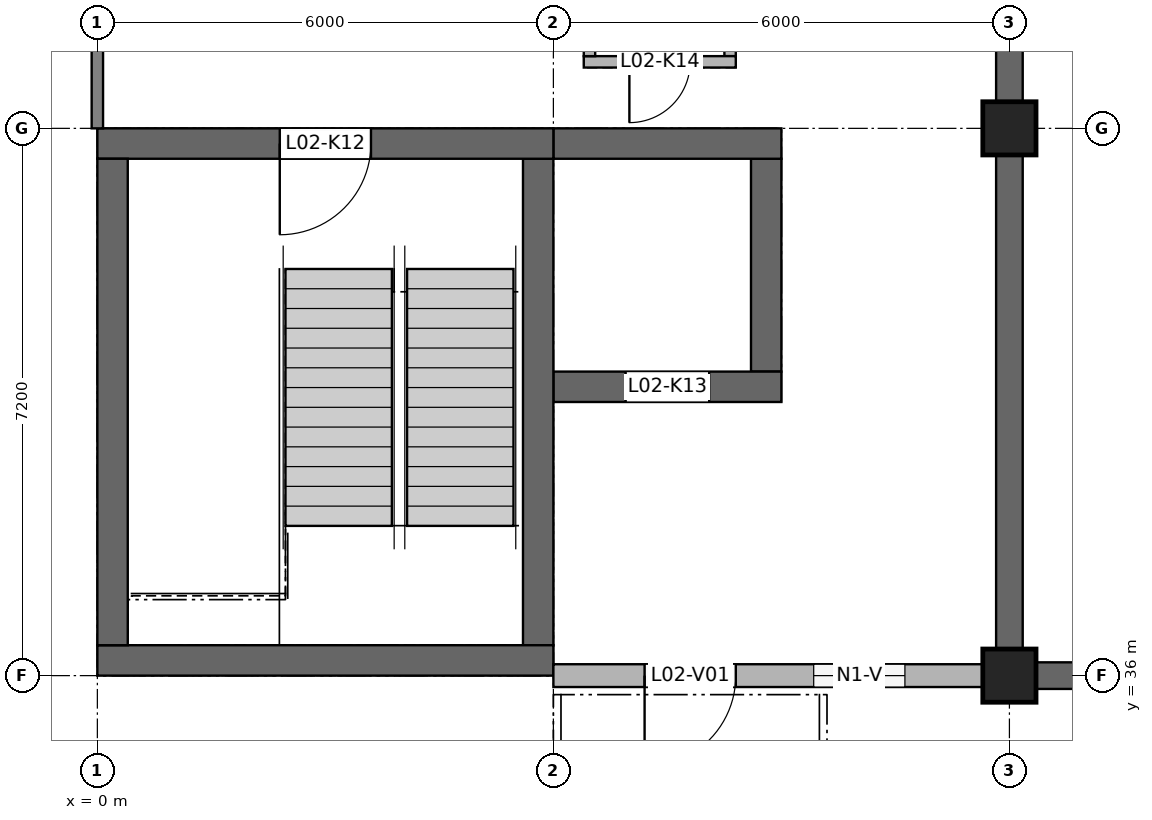
"""IFC4 building model, lengths in metres.
Left out: names, types, materials, properties, quantities, classifications, styles, units other than length and angle.
Written with IfcOpenShell. Run it as: python <this file> out.ifc"""

import sys

from ifc_helpers import new_model, si_unit, direction, frame, frame_2d, origin, origin_2d, place, context, subcontext, project, spatial, rectangle, extrude, element, fill, save


model = new_model("IFC4")
c1 = context("Model", 3, precision=1e-05, world=origin(), true_north=direction((0.0, 1.0)))
c2 = subcontext(c1, "Body", "Model", "MODEL_VIEW")
j1 = project(units=[si_unit("LENGTHUNIT", "METRE"), si_unit("PLANEANGLEUNIT", "RADIAN")], contexts=[c1])
p1 = place(None, origin())
s1 = spatial("IfcSite", under=j1, at=p1, CompositionType="ELEMENT")
p2 = place(p1, origin())
s2 = spatial("IfcBuilding", under=s1, at=p2, CompositionType="ELEMENT")
p3 = place(p2, frame((0.0, 0.0, 8.4)))
s3 = spatial("IfcBuildingStorey", under=s2, at=p3, CompositionType="ELEMENT", Elevation=8.4)
p4 = place(p3, frame((0.0, 36.2, 0.0), z_axis=(0.0, 0.0, 1.0), x_axis=(1.0, 0.0, 0.0)))
e1 = element("IfcWall", 1, at=p4, inside=s3, PredefinedType="SHEAR", context=c2, shape_type="SweptSolid", body=[
    extrude(rectangle(XDim=6.0, YDim=0.4, at=frame_2d((3.0, 0.0))), origin(), (0.0, 0.0, 1.0), 4.0),
])
p5 = place(p3, frame((0.0, 43.0, 0.0), z_axis=(0.0, 0.0, 1.0), x_axis=(1.0, 0.0, 0.0)))
e2 = element("IfcWall", 2, at=p5, inside=s3, PredefinedType="SHEAR", context=c2, shape_type="SweptSolid", body=[
    extrude(rectangle(XDim=6.0, YDim=0.4, at=frame_2d((3.0, 0.0))), origin(), (0.0, 0.0, 1.0), 4.0),
])
p6 = place(p5, frame((2.4, 0.0, 0.0)))
e3 = element("IfcOpeningElement", 3, at=p6, cuts=e2, PredefinedType="OPENING", context=c2, shape_type="SweptSolid", body=[
    extrude(rectangle(XDim=1.2, YDim=2.1, at=frame_2d((0.6, 1.05))), frame((0.0, 0.21, 0.0), z_axis=(0.0, -1.0, 0.0), x_axis=(1.0, 0.0, 0.0)), (0.0, 0.0, 1.0), 0.42),
])
for number, where, z_axis, x_axis in (
    (4, (0.2, 36.4, 0.0), (0.0, 0.0, 1.0), (0.0, 1.0, 0.0)),
    (5, (5.8, 36.4, 0.0), (0.0, 0.0, 1.0), (0.0, 1.0, 0.0)),
):
    element("IfcWall", number, at=place(p3, frame(where, z_axis=z_axis, x_axis=x_axis)), inside=s3, PredefinedType="SHEAR", context=c2, shape_type="SweptSolid", body=[
        extrude(rectangle(XDim=6.4, YDim=0.4, at=frame_2d((3.2, 0.0))), origin(), (0.0, 0.0, 1.0), 4.0),
    ])
p7 = place(p3, frame((6.0, 39.8, 0.0), z_axis=(0.0, 0.0, 1.0), x_axis=(1.0, 0.0, 0.0)))
e6 = element("IfcWall", 6, at=p7, inside=s3, PredefinedType="SHEAR", context=c2, shape_type="SweptSolid", body=[
    extrude(rectangle(XDim=3.0, YDim=0.4, at=frame_2d((1.5, 0.0))), origin(), (0.0, 0.0, 1.0), 4.2),
])
p8 = place(p7, frame((0.95, 0.0, 0.0)))
e7 = element("IfcOpeningElement", 7, at=p8, cuts=e6, PredefinedType="OPENING", context=c2, shape_type="SweptSolid", body=[
    extrude(rectangle(XDim=1.1, YDim=2.1, at=frame_2d((0.55, 1.05))), frame((0.0, 0.21, 0.0), z_axis=(0.0, -1.0, 0.0), x_axis=(1.0, 0.0, 0.0)), (0.0, 0.0, 1.0), 0.42),
])
p9 = place(p3, frame((6.0, 43.0, 0.0), z_axis=(0.0, 0.0, 1.0), x_axis=(1.0, 0.0, 0.0)))
e8 = element("IfcWall", 8, at=p9, inside=s3, PredefinedType="SHEAR", context=c2, shape_type="SweptSolid", body=[
    extrude(rectangle(XDim=3.0, YDim=0.4, at=frame_2d((1.5, 0.0))), origin(), (0.0, 0.0, 1.0), 4.2),
])
p10 = place(p3, frame((8.8, 40.0, 0.0), z_axis=(0.0, 0.0, 1.0), x_axis=(0.0, 1.0, 0.0)))
e9 = element("IfcWall", 9, at=p10, inside=s3, PredefinedType="SHEAR", context=c2, shape_type="SweptSolid", body=[
    extrude(rectangle(XDim=2.8, YDim=0.4, at=frame_2d((1.4, 0.0))), origin(), (0.0, 0.0, 1.0), 4.2),
])
p11 = place(p3, frame((6.4, 44.075, 0.0), z_axis=(0.0, 0.0, 1.0), x_axis=(1.0, 0.0, 0.0)))
e10 = element("IfcWall", 10, at=p11, inside=s3, PredefinedType="SOLIDWALL", context=c2, shape_type="SweptSolid", body=[
    extrude(rectangle(XDim=2.0, YDim=0.15, at=frame_2d((1.0, 0.0))), origin(), (0.0, 0.0, 1.0), 4.2),
])
p12 = place(p11, frame((0.6, 0.0, 0.0)))
e11 = element("IfcOpeningElement", 11, at=p12, cuts=e10, PredefinedType="OPENING", context=c2, shape_type="SweptSolid", body=[
    extrude(rectangle(XDim=0.8, YDim=2.1, at=frame_2d((0.4, 1.05))), frame((0.0, 0.085, 0.0), z_axis=(0.0, -1.0, 0.0), x_axis=(1.0, 0.0, 0.0)), (0.0, 0.0, 1.0), 0.17),
])
for number, where, z_axis, x_axis in (
    (12, (6.475, 44.15, 0.0), (0.0, 0.0, 1.0), (0.0, 1.0, 0.0)),
    (13, (8.325, 44.15, 0.0), (0.0, 0.0, 1.0), (0.0, 1.0, 0.0)),
):
    element("IfcWall", number, at=place(p3, frame(where, z_axis=z_axis, x_axis=x_axis)), inside=s3, PredefinedType="SOLIDWALL", context=c2, shape_type="SweptSolid", body=[
        extrude(rectangle(XDim=0.9, YDim=0.15, at=frame_2d((0.45, 0.0))), origin(), (0.0, 0.0, 1.0), 4.2),
    ])
for number, where, z_axis, x_axis in (
    (14, (12.0, 36.0, 0.0), (0.0, 0.0, 1.0), (1.0, 0.0, 0.0)),
    (15, (12.0, 43.2, 0.0), (0.0, 0.0, 1.0), (1.0, 0.0, 0.0)),
):
    element("IfcColumn", number, at=place(p3, frame(where, z_axis=z_axis, x_axis=x_axis)), inside=s3, PredefinedType="COLUMN", context=c2, shape_type="SweptSolid", body=[
        extrude(rectangle(XDim=0.7, YDim=0.7, at=origin_2d()), origin(), (0.0, 0.0, 1.0), 4.0),
    ])
for number, where, z_axis, x_axis in (
    (16, (12.0, 36.35, 0.0), (0.0, 0.0, 1.0), (0.0, 1.0, 0.0)),
    (17, (12.0, 43.55, 0.0), (0.0, 0.0, 1.0), (0.0, 1.0, 0.0)),
):
    element("IfcWall", number, at=place(p3, frame(where, z_axis=z_axis, x_axis=x_axis)), inside=s3, PredefinedType="SHEAR", context=c2, shape_type="SweptSolid", body=[
        extrude(rectangle(XDim=6.5, YDim=0.35, at=frame_2d((3.25, 0.0))), origin(), (0.0, 0.0, 1.0), 3.1),
    ])
p13 = place(p3, frame((12.35, 36.0, 0.0), z_axis=(0.0, 0.0, 1.0), x_axis=(1.0, 0.0, 0.0)))
e18 = element("IfcWall", 18, at=p13, inside=s3, PredefinedType="SHEAR", context=c2, shape_type="SweptSolid", body=[
    extrude(rectangle(XDim=17.475, YDim=0.35, at=frame_2d((8.737, 0.0))), origin(), (0.0, 0.0, 1.0), 4.2),
])
p14 = place(p13, frame((0.85, 0.0, 1.2)))
e19 = element("IfcOpeningElement", 19, at=p14, cuts=e18, PredefinedType="OPENING", context=c2, shape_type="SweptSolid", body=[
    extrude(rectangle(XDim=0.6, YDim=2.4, at=frame_2d((0.3, 1.2))), frame((0.0, 0.185, 0.0), z_axis=(0.0, -1.0, 0.0), x_axis=(1.0, 0.0, 0.0)), (0.0, 0.0, 1.0), 0.37),
])
p15 = place(p13, frame((3.85, 0.0, 1.2)))
e20 = element("IfcOpeningElement", 20, at=p15, cuts=e18, PredefinedType="OPENING", context=c2, shape_type="SweptSolid", body=[
    extrude(rectangle(XDim=0.6, YDim=2.4, at=frame_2d((0.3, 1.2))), frame((0.0, 0.185, 0.0), z_axis=(0.0, -1.0, 0.0), x_axis=(1.0, 0.0, 0.0)), (0.0, 0.0, 1.0), 0.37),
])
p16 = place(p13, frame((6.85, 0.0, 1.2)))
e21 = element("IfcOpeningElement", 21, at=p16, cuts=e18, PredefinedType="OPENING", context=c2, shape_type="SweptSolid", body=[
    extrude(rectangle(XDim=0.6, YDim=2.4, at=frame_2d((0.3, 1.2))), frame((0.0, 0.185, 0.0), z_axis=(0.0, -1.0, 0.0), x_axis=(1.0, 0.0, 0.0)), (0.0, 0.0, 1.0), 0.37),
])
p17 = place(p13, frame((9.85, 0.0, 1.2)))
e22 = element("IfcOpeningElement", 22, at=p17, cuts=e18, PredefinedType="OPENING", context=c2, shape_type="SweptSolid", body=[
    extrude(rectangle(XDim=0.6, YDim=2.4, at=frame_2d((0.3, 1.2))), frame((0.0, 0.185, 0.0), z_axis=(0.0, -1.0, 0.0), x_axis=(1.0, 0.0, 0.0)), (0.0, 0.0, 1.0), 0.37),
])
p18 = place(p13, frame((12.85, 0.0, 1.2)))
e23 = element("IfcOpeningElement", 23, at=p18, cuts=e18, PredefinedType="OPENING", context=c2, shape_type="SweptSolid", body=[
    extrude(rectangle(XDim=0.6, YDim=2.4, at=frame_2d((0.3, 1.2))), frame((0.0, 0.185, 0.0), z_axis=(0.0, -1.0, 0.0), x_axis=(1.0, 0.0, 0.0)), (0.0, 0.0, 1.0), 0.37),
])
p19 = place(p13, frame((15.85, 0.0, 1.2)))
e24 = element("IfcOpeningElement", 24, at=p19, cuts=e18, PredefinedType="OPENING", context=c2, shape_type="SweptSolid", body=[
    extrude(rectangle(XDim=0.6, YDim=2.4, at=frame_2d((0.3, 1.2))), frame((0.0, 0.185, 0.0), z_axis=(0.0, -1.0, 0.0), x_axis=(1.0, 0.0, 0.0)), (0.0, 0.0, 1.0), 0.37),
])
p20 = place(p3, frame((6.0, 36.0, 0.0), z_axis=(0.0, 0.0, 1.0), x_axis=(1.0, 0.0, 0.0)))
e25 = element("IfcWall", 25, at=p20, inside=s3, PredefinedType="SOLIDWALL", context=c2, shape_type="SweptSolid", body=[
    extrude(rectangle(XDim=5.65, YDim=0.3, at=frame_2d((2.825, 0.0))), origin(), (0.0, 0.0, 1.0), 3.2),
])
p21 = place(p20, frame((1.2, 0.0, 0.0)))
e26 = element("IfcOpeningElement", 26, at=p21, cuts=e25, PredefinedType="OPENING", context=c2, shape_type="SweptSolid", body=[
    extrude(rectangle(XDim=1.2, YDim=2.4, at=frame_2d((0.6, 1.2))), frame((0.0, 0.16, 0.0), z_axis=(0.0, -1.0, 0.0), x_axis=(1.0, 0.0, 0.0)), (0.0, 0.0, 1.0), 0.32),
])
p22 = place(p20, frame((3.425, 0.0, 0.9)))
e27 = element("IfcOpeningElement", 27, at=p22, cuts=e25, PredefinedType="OPENING", context=c2, shape_type="SweptSolid", body=[
    extrude(rectangle(XDim=1.2, YDim=1.5, at=frame_2d((0.6, 0.75))), frame((0.0, 0.16, 0.0), z_axis=(0.0, -1.0, 0.0), x_axis=(1.0, 0.0, 0.0)), (0.0, 0.0, 1.0), 0.32),
])
p23 = place(p21, frame((1.2, 0.0, 0.0), z_axis=(0.0, 0.0, 1.0), x_axis=(-1.0, 0.0, 0.0)))
e28 = element("IfcDoor", 28, at=p23, inside=s3, OperationType="SINGLE_SWING_RIGHT", PredefinedType="DOOR", context=c2, shape_type="SweptSolid", body=[
    extrude(rectangle(XDim=1.2, YDim=2.4, at=frame_2d((0.6, 1.2))), frame((0.0, 0.025, 0.0), z_axis=(0.0, -1.0, 0.0), x_axis=(1.0, 0.0, 0.0)), (0.0, 0.0, 1.0), 0.05),
])
fill(e26, e28)
p24 = place(p22, origin())
e29 = element("IfcWindow", 29, at=p24, inside=s3, PartitioningType="SINGLE_PANEL", PredefinedType="WINDOW", context=c2, shape_type="SweptSolid", body=[
    extrude(rectangle(XDim=1.2, YDim=1.5, at=frame_2d((0.6, 0.75))), frame((0.0, 0.03, 0.0), z_axis=(0.0, -1.0, 0.0), x_axis=(1.0, 0.0, 0.0)), (0.0, 0.0, 1.0), 0.06),
])
fill(e27, e29)
p25 = place(p6, frame((1.2, 0.0, 0.0), z_axis=(0.0, 0.0, 1.0), x_axis=(-1.0, 0.0, 0.0)))
e30 = element("IfcDoor", 30, at=p25, inside=s3, OperationType="SINGLE_SWING_RIGHT", PredefinedType="DOOR", context=c2, shape_type="SweptSolid", body=[
    extrude(rectangle(XDim=1.2, YDim=2.1, at=frame_2d((0.6, 1.05))), frame((0.0, 0.025, 0.0), z_axis=(0.0, -1.0, 0.0), x_axis=(1.0, 0.0, 0.0)), (0.0, 0.0, 1.0), 0.05),
])
fill(e3, e30)
p26 = place(p8, origin())
e31 = element("IfcDoor", 31, at=p26, inside=s3, OperationType="DOUBLE_DOOR_SLIDING", PredefinedType="DOOR", context=c2, shape_type="SweptSolid", body=[
    extrude(rectangle(XDim=1.1, YDim=2.1, at=frame_2d((0.55, 1.05))), frame((0.0, 0.025, 0.0), z_axis=(0.0, -1.0, 0.0), x_axis=(1.0, 0.0, 0.0)), (0.0, 0.0, 1.0), 0.05),
])
fill(e7, e31)
p27 = place(p12, frame((0.8, 0.0, 0.0), z_axis=(0.0, 0.0, 1.0), x_axis=(-1.0, 0.0, 0.0)))
e32 = element("IfcDoor", 32, at=p27, inside=s3, OperationType="SINGLE_SWING_RIGHT", PredefinedType="DOOR", context=c2, shape_type="SweptSolid", body=[
    extrude(rectangle(XDim=0.8, YDim=2.1, at=frame_2d((0.4, 1.05))), frame((0.0, 0.025, 0.0), z_axis=(0.0, -1.0, 0.0), x_axis=(1.0, 0.0, 0.0)), (0.0, 0.0, 1.0), 0.05),
])
fill(e11, e32)
save(model, sys.argv[1])
